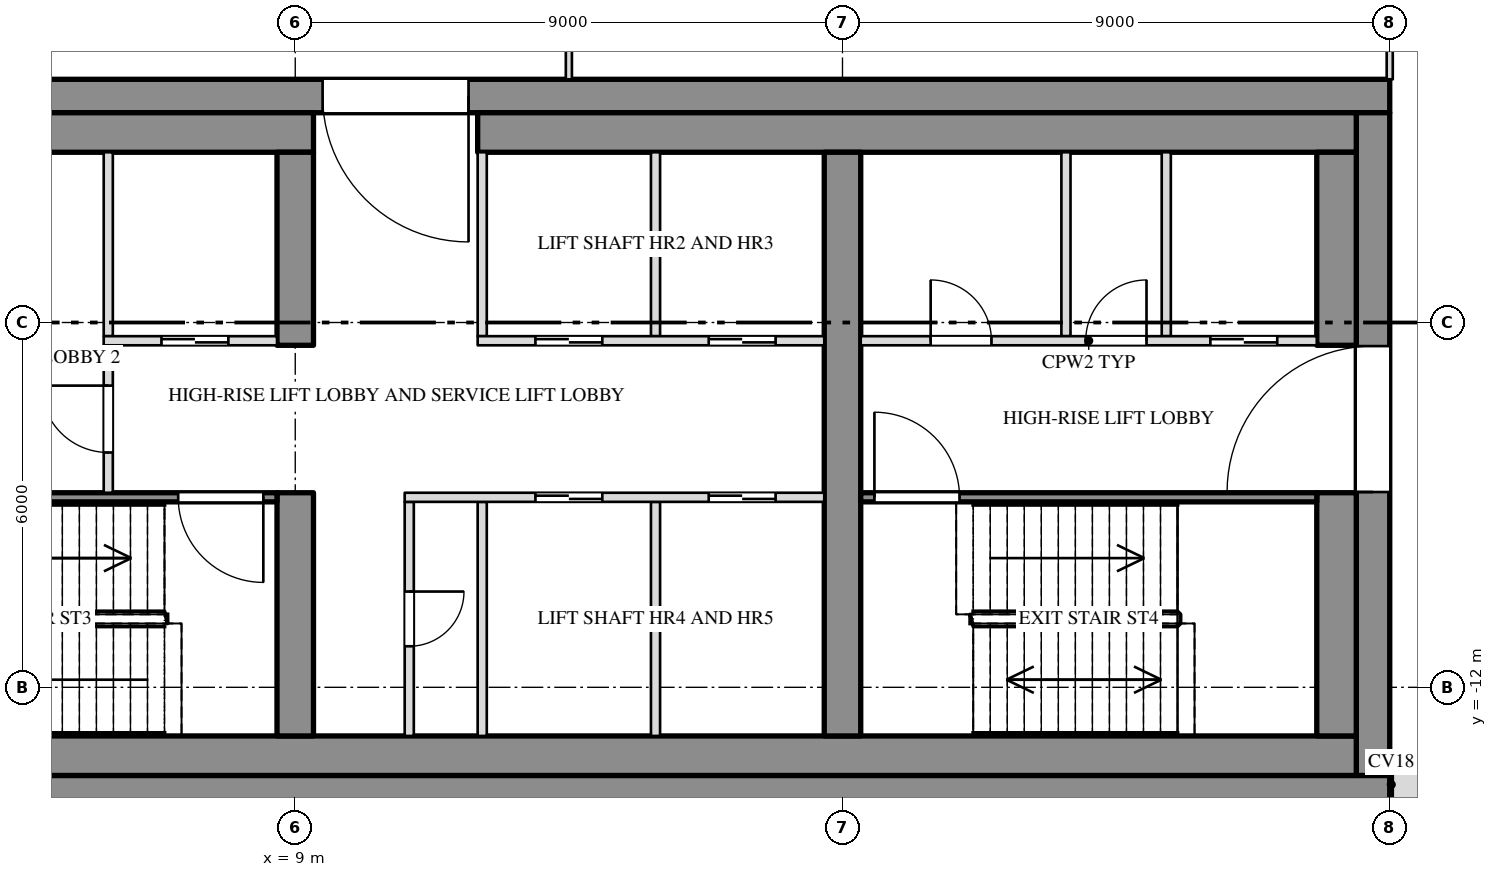
"""IFC4 building model, lengths in metres.
Left out: names, types, materials, properties, quantities, classifications, styles, units other than length and angle.
Written with IfcOpenShell. Run it as: python <this file> out.ifc"""

import sys

from ifc_helpers import new_model, si_unit, direction, frame, frame_2d, origin, place, context, subcontext, project, spatial, rectangle, extrude, element, fill, save


model = new_model("IFC4")
c1 = context("Model", 3, precision=1e-05, world=origin(), true_north=direction((0.0, 1.0)))
c2 = subcontext(c1, "Body", "Model", "MODEL_VIEW")
j1 = project(units=[si_unit("LENGTHUNIT", "METRE"), si_unit("PLANEANGLEUNIT", "RADIAN")], contexts=[c1])
p1 = place(None, origin())
s1 = spatial("IfcSite", under=j1, at=p1, CompositionType="ELEMENT")
p2 = place(p1, origin())
s2 = spatial("IfcBuilding", under=s1, at=p2, CompositionType="ELEMENT")
p3 = place(p2, frame((0.0, 0.0, 276.5)))
s3 = spatial("IfcBuildingStorey", under=s2, at=p3, CompositionType="ELEMENT", Elevation=276.5)
p4 = place(p3, frame((-27.0, -2.275, 0.0), z_axis=(0.0, 0.0, 1.0), x_axis=(1.0, 0.0, 0.0)))
e1 = element("IfcWall", 1, at=p4, inside=s3, PredefinedType="SHEAR", context=c2, shape_type="SweptSolid", body=[
    extrude(rectangle(XDim=54.0, YDim=0.55, at=frame_2d((27.0, 0.0))), origin(), (0.0, 0.0, 1.0), 3.78),
])
p5 = place(p4, frame((15.15, 0.0, 0.0)))
e2 = element("IfcOpeningElement", 2, at=p5, cuts=e1, PredefinedType="OPENING", context=c2, shape_type="SweptSolid", body=[
    extrude(rectangle(XDim=2.4, YDim=2.1, at=frame_2d((1.2, 1.05))), frame((0.0, 0.287, 0.0), z_axis=(0.0, -1.0, 0.0), x_axis=(1.0, 0.0, 0.0)), (0.0, 0.0, 1.0), 0.574),
])
p6 = place(p4, frame((36.45, 0.0, 0.0)))
e3 = element("IfcOpeningElement", 3, at=p6, cuts=e1, PredefinedType="OPENING", context=c2, shape_type="SweptSolid", body=[
    extrude(rectangle(XDim=2.4, YDim=2.1, at=frame_2d((1.2, 1.05))), frame((0.0, 0.287, 0.0), z_axis=(0.0, -1.0, 0.0), x_axis=(1.0, 0.0, 0.0)), (0.0, 0.0, 1.0), 0.574),
])
p7 = place(p3, frame((-27.0, -13.725, 0.0), z_axis=(0.0, 0.0, 1.0), x_axis=(1.0, 0.0, 0.0)))
e4 = element("IfcWall", 4, at=p7, inside=s3, PredefinedType="SHEAR", context=c2, shape_type="SweptSolid", body=[
    extrude(rectangle(XDim=54.0, YDim=0.55, at=frame_2d((27.0, 0.0))), origin(), (0.0, 0.0, 1.0), 3.78),
])
p8 = place(p3, frame((26.725, -13.45, 0.0), z_axis=(0.0, 0.0, 1.0), x_axis=(0.0, 1.0, 0.0)))
e5 = element("IfcWall", 5, at=p8, inside=s3, PredefinedType="SHEAR", context=c2, shape_type="SweptSolid", body=[
    extrude(rectangle(XDim=10.9, YDim=0.55, at=frame_2d((5.45, 0.0))), origin(), (0.0, 0.0, 1.0), 3.78),
])
p9 = place(p8, frame((4.662, 0.0, 0.0)))
e6 = element("IfcOpeningElement", 6, at=p9, cuts=e5, PredefinedType="OPENING", context=c2, shape_type="SweptSolid", body=[
    extrude(rectangle(XDim=2.4, YDim=2.1, at=frame_2d((1.2, 1.05))), frame((0.0, 0.287, 0.0), z_axis=(0.0, -1.0, 0.0), x_axis=(1.0, 0.0, 0.0)), (0.0, 0.0, 1.0), 0.574),
])
p10 = place(p3, frame((-9.3, -2.875, 0.0), z_axis=(0.0, 0.0, 1.0), x_axis=(1.0, 0.0, 0.0)))
e7 = element("IfcWall", 7, at=p10, inside=s3, PredefinedType="SHEAR", context=c2, shape_type="SweptSolid", body=[
    extrude(rectangle(XDim=18.6, YDim=0.65, at=frame_2d((9.3, 0.0))), origin(), (0.0, 0.0, 1.0), 3.78),
])
p11 = place(p3, frame((12.0, -2.875, 0.0), z_axis=(0.0, 0.0, 1.0), x_axis=(1.0, 0.0, 0.0)))
e8 = element("IfcWall", 8, at=p11, inside=s3, PredefinedType="SHEAR", context=c2, shape_type="SweptSolid", body=[
    extrude(rectangle(XDim=14.45, YDim=0.65, at=frame_2d((7.225, 0.0))), origin(), (0.0, 0.0, 1.0), 3.78),
])
p12 = place(p3, frame((-26.45, -13.125, 0.0), z_axis=(0.0, 0.0, 1.0), x_axis=(1.0, 0.0, 0.0)))
e9 = element("IfcWall", 9, at=p12, inside=s3, PredefinedType="SHEAR", context=c2, shape_type="SweptSolid", body=[
    extrude(rectangle(XDim=52.9, YDim=0.65, at=frame_2d((26.45, 0.0))), origin(), (0.0, 0.0, 1.0), 3.78),
])
p13 = place(p3, frame((26.125, -12.8, 0.0), z_axis=(0.0, 0.0, 1.0), x_axis=(0.0, 1.0, 0.0)))
e10 = element("IfcWall", 10, at=p13, inside=s3, PredefinedType="SHEAR", context=c2, shape_type="SweptSolid", body=[
    extrude(rectangle(XDim=4.0, YDim=0.65, at=frame_2d((2.0, 0.0))), origin(), (0.0, 0.0, 1.0), 3.78),
])
p14 = place(p3, frame((26.125, -6.375, 0.0), z_axis=(0.0, 0.0, 1.0), x_axis=(0.0, 1.0, 0.0)))
e11 = element("IfcWall", 11, at=p14, inside=s3, PredefinedType="SHEAR", context=c2, shape_type="SweptSolid", body=[
    extrude(rectangle(XDim=3.175, YDim=0.65, at=frame_2d((1.587, 0.0))), origin(), (0.0, 0.0, 1.0), 3.78),
])
p15 = place(p3, frame((9.0, -12.8, 0.0), z_axis=(0.0, 0.0, 1.0), x_axis=(0.0, 1.0, 0.0)))
e12 = element("IfcWall", 12, at=p15, inside=s3, PredefinedType="SHEAR", context=c2, shape_type="SweptSolid", body=[
    extrude(rectangle(XDim=4.0, YDim=0.6, at=frame_2d((2.0, 0.0))), origin(), (0.0, 0.0, 1.0), 3.78),
])
p16 = place(p3, frame((9.0, -6.375, 0.0), z_axis=(0.0, 0.0, 1.0), x_axis=(0.0, 1.0, 0.0)))
e13 = element("IfcWall", 13, at=p16, inside=s3, PredefinedType="SHEAR", context=c2, shape_type="SweptSolid", body=[
    extrude(rectangle(XDim=3.175, YDim=0.6, at=frame_2d((1.587, 0.0))), origin(), (0.0, 0.0, 1.0), 3.78),
])
p17 = place(p3, frame((18.0, -12.8, 0.0), z_axis=(0.0, 0.0, 1.0), x_axis=(0.0, 1.0, 0.0)))
e14 = element("IfcWall", 14, at=p17, inside=s3, PredefinedType="SHEAR", context=c2, shape_type="SweptSolid", body=[
    extrude(rectangle(XDim=9.6, YDim=0.6, at=frame_2d((4.8, 0.0))), origin(), (0.0, 0.0, 1.0), 3.78),
])
p18 = place(p3, frame((13.5, -2.0, 0.0), z_axis=(0.0, 0.0, 1.0), x_axis=(0.0, 1.0, 0.0)))
e15 = element("IfcWall", 15, at=p18, inside=s3, PredefinedType="PARTITIONING", context=c2, shape_type="SweptSolid", body=[
    extrude(rectangle(XDim=8.58, YDim=0.1, at=frame_2d((4.29, 0.0))), origin(), (0.0, 0.0, 1.0), 3.247),
])
p19 = place(p18, frame((3.85, 0.0, 0.0)))
e16 = element("IfcOpeningElement", 16, at=p19, cuts=e15, PredefinedType="OPENING", context=c2, shape_type="SweptSolid", body=[
    extrude(rectangle(XDim=0.9, YDim=2.1, at=frame_2d((0.45, 1.05))), frame((0.0, 0.062, 0.0), z_axis=(0.0, -1.0, 0.0), x_axis=(1.0, 0.0, 0.0)), (0.0, 0.0, 1.0), 0.124),
])
p20 = place(p3, frame((27.0, -2.0, 0.0), z_axis=(0.0, 0.0, 1.0), x_axis=(0.0, 1.0, 0.0)))
e17 = element("IfcWall", 17, at=p20, inside=s3, PredefinedType="PARTITIONING", context=c2, shape_type="SweptSolid", body=[
    extrude(rectangle(XDim=6.313, YDim=0.1, at=frame_2d((3.157, 0.0))), origin(), (0.0, 0.0, 1.0), 3.247),
])
p21 = place(p3, frame((27.05, -13.6, 0.0), z_axis=(0.0, 0.0, 1.0), x_axis=(1.0, 0.0, 0.0)))
e18 = element("IfcWall", 18, at=p21, inside=s3, PredefinedType="SOLIDWALL", context=c2, shape_type="SweptSolid", body=[
    extrude(rectangle(XDim=2.897, YDim=0.8, at=frame_2d((1.449, 0.0))), origin(), (0.0, 0.0, 1.0), 3.78),
])
for number, where, z_axis, x_axis in (
    (19, (5.925, -6.225, 0.0), (0.0, 0.0, 1.0), (0.0, 1.0, 0.0)),
    (20, (12.075, -6.225, 0.0), (0.0, 0.0, 1.0), (0.0, 1.0, 0.0)),
    (21, (14.925, -6.225, 0.0), (0.0, 0.0, 1.0), (0.0, 1.0, 0.0)),
    (22, (21.675, -6.225, 0.0), (0.0, 0.0, 1.0), (0.0, 1.0, 0.0)),
    (23, (23.325, -6.225, 0.0), (0.0, 0.0, 1.0), (0.0, 1.0, 0.0)),
):
    element("IfcWall", number, at=place(p3, frame(where, z_axis=z_axis, x_axis=x_axis)), inside=s3, PredefinedType="PARTITIONING", context=c2, shape_type="SweptSolid", body=[
        extrude(rectangle(XDim=3.025, YDim=0.15, at=frame_2d((1.513, 0.0))), origin(), (0.0, 0.0, 1.0), 3.78),
    ])
p22 = place(p3, frame((10.875, -12.8, 0.0), z_axis=(0.0, 0.0, 1.0), x_axis=(0.0, 1.0, 0.0)))
e24 = element("IfcWall", 24, at=p22, inside=s3, PredefinedType="PARTITIONING", context=c2, shape_type="SweptSolid", body=[
    extrude(rectangle(XDim=3.85, YDim=0.15, at=frame_2d((1.925, 0.0))), origin(), (0.0, 0.0, 1.0), 3.78),
])
p23 = place(p22, frame((1.475, 0.0, 0.0)))
e25 = element("IfcOpeningElement", 25, at=p23, cuts=e24, PredefinedType="OPENING", context=c2, shape_type="SweptSolid", body=[
    extrude(rectangle(XDim=0.9, YDim=2.1, at=frame_2d((0.45, 1.05))), frame((0.0, 0.087, 0.0), z_axis=(0.0, -1.0, 0.0), x_axis=(1.0, 0.0, 0.0)), (0.0, 0.0, 1.0), 0.174),
])
for number, where, z_axis, x_axis in (
    (26, (12.075, -12.8, 0.0), (0.0, 0.0, 1.0), (0.0, 1.0, 0.0)),
    (27, (14.925, -12.8, 0.0), (0.0, 0.0, 1.0), (0.0, 1.0, 0.0)),
):
    element("IfcWall", number, at=place(p3, frame(where, z_axis=z_axis, x_axis=x_axis)), inside=s3, PredefinedType="PARTITIONING", context=c2, shape_type="SweptSolid", body=[
        extrude(rectangle(XDim=3.85, YDim=0.15, at=frame_2d((1.925, 0.0))), origin(), (0.0, 0.0, 1.0), 3.78),
    ])
p24 = place(p3, frame((5.925, -8.8, 0.0), z_axis=(0.0, 0.0, 1.0), x_axis=(0.0, 1.0, 0.0)))
e28 = element("IfcWall", 28, at=p24, inside=s3, PredefinedType="PARTITIONING", context=c2, shape_type="SweptSolid", body=[
    extrude(rectangle(XDim=2.425, YDim=0.15, at=frame_2d((1.212, 0.0))), origin(), (0.0, 0.0, 1.0), 3.78),
])
p25 = place(p24, frame((0.662, 0.0, 0.0)))
e29 = element("IfcOpeningElement", 29, at=p25, cuts=e28, PredefinedType="OPENING", context=c2, shape_type="SweptSolid", body=[
    extrude(rectangle(XDim=1.1, YDim=2.1, at=frame_2d((0.55, 1.05))), frame((0.0, 0.087, 0.0), z_axis=(0.0, -1.0, 0.0), x_axis=(1.0, 0.0, 0.0)), (0.0, 0.0, 1.0), 0.174),
])
p26 = place(p3, frame((5.85, -6.3, 0.0), z_axis=(0.0, 0.0, 1.0), x_axis=(1.0, 0.0, 0.0)))
e30 = element("IfcWall", 30, at=p26, inside=s3, PredefinedType="PARTITIONING", context=c2, shape_type="SweptSolid", body=[
    extrude(rectangle(XDim=2.85, YDim=0.15, at=frame_2d((1.425, 0.0))), origin(), (0.0, 0.0, 1.0), 3.78),
])
p27 = place(p26, frame((0.95, 0.0, 0.0)))
e31 = element("IfcOpeningElement", 31, at=p27, cuts=e30, PredefinedType="OPENING", context=c2, shape_type="SweptSolid", body=[
    extrude(rectangle(XDim=1.1, YDim=2.1, at=frame_2d((0.55, 1.05))), frame((0.0, 0.087, 0.0), z_axis=(0.0, -1.0, 0.0), x_axis=(1.0, 0.0, 0.0)), (0.0, 0.0, 1.0), 0.174),
])
p28 = place(p3, frame((12.0, -6.3, 0.0), z_axis=(0.0, 0.0, 1.0), x_axis=(1.0, 0.0, 0.0)))
e32 = element("IfcWall", 32, at=p28, inside=s3, PredefinedType="PARTITIONING", context=c2, shape_type="SweptSolid", body=[
    extrude(rectangle(XDim=5.7, YDim=0.15, at=frame_2d((2.85, 0.0))), origin(), (0.0, 0.0, 1.0), 3.78),
])
p29 = place(p28, frame((0.95, 0.0, 0.0)))
e33 = element("IfcOpeningElement", 33, at=p29, cuts=e32, PredefinedType="OPENING", context=c2, shape_type="SweptSolid", body=[
    extrude(rectangle(XDim=1.1, YDim=2.1, at=frame_2d((0.55, 1.05))), frame((0.0, 0.087, 0.0), z_axis=(0.0, -1.0, 0.0), x_axis=(1.0, 0.0, 0.0)), (0.0, 0.0, 1.0), 0.174),
])
p30 = place(p28, frame((3.8, 0.0, 0.0)))
e34 = element("IfcOpeningElement", 34, at=p30, cuts=e32, PredefinedType="OPENING", context=c2, shape_type="SweptSolid", body=[
    extrude(rectangle(XDim=1.1, YDim=2.1, at=frame_2d((0.55, 1.05))), frame((0.0, 0.087, 0.0), z_axis=(0.0, -1.0, 0.0), x_axis=(1.0, 0.0, 0.0)), (0.0, 0.0, 1.0), 0.174),
])
p31 = place(p3, frame((18.3, -6.3, 0.0), z_axis=(0.0, 0.0, 1.0), x_axis=(1.0, 0.0, 0.0)))
e35 = element("IfcWall", 35, at=p31, inside=s3, PredefinedType="PARTITIONING", context=c2, shape_type="SweptSolid", body=[
    extrude(rectangle(XDim=7.5, YDim=0.15, at=frame_2d((3.75, 0.0))), origin(), (0.0, 0.0, 1.0), 3.78),
])
p32 = place(p31, frame((1.15, 0.0, 0.0)))
e36 = element("IfcOpeningElement", 36, at=p32, cuts=e35, PredefinedType="OPENING", context=c2, shape_type="SweptSolid", body=[
    extrude(rectangle(XDim=1.0, YDim=2.1, at=frame_2d((0.5, 1.05))), frame((0.0, 0.087, 0.0), z_axis=(0.0, -1.0, 0.0), x_axis=(1.0, 0.0, 0.0)), (0.0, 0.0, 1.0), 0.174),
])
p33 = place(p31, frame((3.7, 0.0, 0.0)))
e37 = element("IfcOpeningElement", 37, at=p33, cuts=e35, PredefinedType="OPENING", context=c2, shape_type="SweptSolid", body=[
    extrude(rectangle(XDim=1.0, YDim=2.1, at=frame_2d((0.5, 1.05))), frame((0.0, 0.087, 0.0), z_axis=(0.0, -1.0, 0.0), x_axis=(1.0, 0.0, 0.0)), (0.0, 0.0, 1.0), 0.174),
])
p34 = place(p31, frame((5.75, 0.0, 0.0)))
e38 = element("IfcOpeningElement", 38, at=p34, cuts=e35, PredefinedType="OPENING", context=c2, shape_type="SweptSolid", body=[
    extrude(rectangle(XDim=1.1, YDim=2.1, at=frame_2d((0.55, 1.05))), frame((0.0, 0.087, 0.0), z_axis=(0.0, -1.0, 0.0), x_axis=(1.0, 0.0, 0.0)), (0.0, 0.0, 1.0), 0.174),
])
p35 = place(p3, frame((0.3, -8.875, 0.0), z_axis=(0.0, 0.0, 1.0), x_axis=(1.0, 0.0, 0.0)))
e39 = element("IfcWall", 39, at=p35, inside=s3, PredefinedType="SHEAR", context=c2, shape_type="SweptSolid", body=[
    extrude(rectangle(XDim=8.4, YDim=0.15, at=frame_2d((4.2, 0.0))), origin(), (0.0, 0.0, 1.0), 3.78),
])
p36 = place(p35, frame((6.775, 0.0, 0.0)))
e40 = element("IfcOpeningElement", 40, at=p36, cuts=e39, PredefinedType="OPENING", context=c2, shape_type="SweptSolid", body=[
    extrude(rectangle(XDim=1.4, YDim=2.1, at=frame_2d((0.7, 1.05))), frame((0.0, 0.087, 0.0), z_axis=(0.0, -1.0, 0.0), x_axis=(1.0, 0.0, 0.0)), (0.0, 0.0, 1.0), 0.174),
])
p37 = place(p3, frame((10.8, -8.875, 0.0), z_axis=(0.0, 0.0, 1.0), x_axis=(1.0, 0.0, 0.0)))
e41 = element("IfcWall", 41, at=p37, inside=s3, PredefinedType="PARTITIONING", context=c2, shape_type="SweptSolid", body=[
    extrude(rectangle(XDim=6.9, YDim=0.15, at=frame_2d((3.45, 0.0))), origin(), (0.0, 0.0, 1.0), 3.78),
])
p38 = place(p37, frame((2.15, 0.0, 0.0)))
e42 = element("IfcOpeningElement", 42, at=p38, cuts=e41, PredefinedType="OPENING", context=c2, shape_type="SweptSolid", body=[
    extrude(rectangle(XDim=1.1, YDim=2.1, at=frame_2d((0.55, 1.05))), frame((0.0, 0.087, 0.0), z_axis=(0.0, -1.0, 0.0), x_axis=(1.0, 0.0, 0.0)), (0.0, 0.0, 1.0), 0.174),
])
p39 = place(p37, frame((5.0, 0.0, 0.0)))
e43 = element("IfcOpeningElement", 43, at=p39, cuts=e41, PredefinedType="OPENING", context=c2, shape_type="SweptSolid", body=[
    extrude(rectangle(XDim=1.1, YDim=2.1, at=frame_2d((0.55, 1.05))), frame((0.0, 0.087, 0.0), z_axis=(0.0, -1.0, 0.0), x_axis=(1.0, 0.0, 0.0)), (0.0, 0.0, 1.0), 0.174),
])
p40 = place(p3, frame((18.3, -8.875, 0.0), z_axis=(0.0, 0.0, 1.0), x_axis=(1.0, 0.0, 0.0)))
e44 = element("IfcWall", 44, at=p40, inside=s3, PredefinedType="SHEAR", context=c2, shape_type="SweptSolid", body=[
    extrude(rectangle(XDim=7.5, YDim=0.15, at=frame_2d((3.75, 0.0))), origin(), (0.0, 0.0, 1.0), 3.78),
])
p41 = place(p40, frame((0.225, 0.0, 0.0)))
e45 = element("IfcOpeningElement", 45, at=p41, cuts=e44, PredefinedType="OPENING", context=c2, shape_type="SweptSolid", body=[
    extrude(rectangle(XDim=1.4, YDim=2.1, at=frame_2d((0.7, 1.05))), frame((0.0, 0.087, 0.0), z_axis=(0.0, -1.0, 0.0), x_axis=(1.0, 0.0, 0.0)), (0.0, 0.0, 1.0), 0.174),
])
p42 = place(p25, origin())
e46 = element("IfcDoor", 46, at=p42, inside=s3, OperationType="SINGLE_SWING_RIGHT", PredefinedType="DOOR", context=c2, shape_type="SweptSolid", body=[
    extrude(rectangle(XDim=1.1, YDim=2.1, at=frame_2d((0.55, 1.05))), frame((0.0, 0.025, 0.0), z_axis=(0.0, -1.0, 0.0), x_axis=(1.0, 0.0, 0.0)), (0.0, 0.0, 1.0), 0.05),
])
fill(e29, e46)
p43 = place(p27, origin())
e47 = element("IfcDoor", 47, at=p43, inside=s3, OperationType="SLIDING_TO_RIGHT", PredefinedType="DOOR", context=c2, shape_type="SweptSolid", body=[
    extrude(rectangle(XDim=1.1, YDim=2.1, at=frame_2d((0.55, 1.05))), frame((0.0, 0.025, 0.0), z_axis=(0.0, -1.0, 0.0), x_axis=(1.0, 0.0, 0.0)), (0.0, 0.0, 1.0), 0.05),
])
fill(e31, e47)
p44 = place(p36, origin())
e48 = element("IfcDoor", 48, at=p44, inside=s3, OperationType="DOUBLE_DOOR_SINGLE_SWING", PredefinedType="DOOR", context=c2, shape_type="SweptSolid", body=[
    extrude(rectangle(XDim=1.4, YDim=2.1, at=frame_2d((0.7, 1.05))), frame((0.0, 0.025, 0.0), z_axis=(0.0, -1.0, 0.0), x_axis=(1.0, 0.0, 0.0)), (0.0, 0.0, 1.0), 0.05),
])
fill(e40, e48)
p45 = place(p6, origin())
e49 = element("IfcDoor", 49, at=p45, inside=s3, OperationType="DOUBLE_DOOR_SINGLE_SWING", PredefinedType="DOOR", context=c2, shape_type="SweptSolid", body=[
    extrude(rectangle(XDim=2.4, YDim=2.1, at=frame_2d((1.2, 1.05))), frame((0.0, 0.025, 0.0), z_axis=(0.0, -1.0, 0.0), x_axis=(1.0, 0.0, 0.0)), (0.0, 0.0, 1.0), 0.05),
])
fill(e3, e49)
p46 = place(p23, origin())
e50 = element("IfcDoor", 50, at=p46, inside=s3, OperationType="SINGLE_SWING_LEFT", PredefinedType="DOOR", context=c2, shape_type="SweptSolid", body=[
    extrude(rectangle(XDim=0.9, YDim=2.1, at=frame_2d((0.45, 1.05))), frame((0.0, 0.025, 0.0), z_axis=(0.0, -1.0, 0.0), x_axis=(1.0, 0.0, 0.0)), (0.0, 0.0, 1.0), 0.05),
])
fill(e25, e50)
p47 = place(p38, origin())
e51 = element("IfcDoor", 51, at=p47, inside=s3, OperationType="SLIDING_TO_RIGHT", PredefinedType="DOOR", context=c2, shape_type="SweptSolid", body=[
    extrude(rectangle(XDim=1.1, YDim=2.1, at=frame_2d((0.55, 1.05))), frame((0.0, 0.025, 0.0), z_axis=(0.0, -1.0, 0.0), x_axis=(1.0, 0.0, 0.0)), (0.0, 0.0, 1.0), 0.05),
])
fill(e42, e51)
p48 = place(p29, origin())
e52 = element("IfcDoor", 52, at=p48, inside=s3, OperationType="SLIDING_TO_LEFT", PredefinedType="DOOR", context=c2, shape_type="SweptSolid", body=[
    extrude(rectangle(XDim=1.1, YDim=2.1, at=frame_2d((0.55, 1.05))), frame((0.0, 0.025, 0.0), z_axis=(0.0, -1.0, 0.0), x_axis=(1.0, 0.0, 0.0)), (0.0, 0.0, 1.0), 0.05),
])
fill(e33, e52)
p49 = place(p39, origin())
e53 = element("IfcDoor", 53, at=p49, inside=s3, OperationType="SLIDING_TO_RIGHT", PredefinedType="DOOR", context=c2, shape_type="SweptSolid", body=[
    extrude(rectangle(XDim=1.1, YDim=2.1, at=frame_2d((0.55, 1.05))), frame((0.0, 0.025, 0.0), z_axis=(0.0, -1.0, 0.0), x_axis=(1.0, 0.0, 0.0)), (0.0, 0.0, 1.0), 0.05),
])
fill(e43, e53)
p50 = place(p30, origin())
e54 = element("IfcDoor", 54, at=p50, inside=s3, OperationType="SLIDING_TO_LEFT", PredefinedType="DOOR", context=c2, shape_type="SweptSolid", body=[
    extrude(rectangle(XDim=1.1, YDim=2.1, at=frame_2d((0.55, 1.05))), frame((0.0, 0.025, 0.0), z_axis=(0.0, -1.0, 0.0), x_axis=(1.0, 0.0, 0.0)), (0.0, 0.0, 1.0), 0.05),
])
fill(e34, e54)
p51 = place(p41, origin())
e55 = element("IfcDoor", 55, at=p51, inside=s3, OperationType="DOUBLE_DOOR_SINGLE_SWING", PredefinedType="DOOR", context=c2, shape_type="SweptSolid", body=[
    extrude(rectangle(XDim=1.4, YDim=2.1, at=frame_2d((0.7, 1.05))), frame((0.0, 0.025, 0.0), z_axis=(0.0, -1.0, 0.0), x_axis=(1.0, 0.0, 0.0)), (0.0, 0.0, 1.0), 0.05),
])
fill(e45, e55)
p52 = place(p32, origin())
e56 = element("IfcDoor", 56, at=p52, inside=s3, OperationType="SINGLE_SWING_LEFT", PredefinedType="DOOR", context=c2, shape_type="SweptSolid", body=[
    extrude(rectangle(XDim=1.0, YDim=2.1, at=frame_2d((0.5, 1.05))), frame((0.0, 0.025, 0.0), z_axis=(0.0, -1.0, 0.0), x_axis=(1.0, 0.0, 0.0)), (0.0, 0.0, 1.0), 0.05),
])
fill(e36, e56)
p53 = place(p33, origin())
e57 = element("IfcDoor", 57, at=p53, inside=s3, OperationType="SINGLE_SWING_RIGHT", PredefinedType="DOOR", context=c2, shape_type="SweptSolid", body=[
    extrude(rectangle(XDim=1.0, YDim=2.1, at=frame_2d((0.5, 1.05))), frame((0.0, 0.025, 0.0), z_axis=(0.0, -1.0, 0.0), x_axis=(1.0, 0.0, 0.0)), (0.0, 0.0, 1.0), 0.05),
])
fill(e37, e57)
p54 = place(p34, origin())
e58 = element("IfcDoor", 58, at=p54, inside=s3, OperationType="SLIDING_TO_LEFT", PredefinedType="DOOR", context=c2, shape_type="SweptSolid", body=[
    extrude(rectangle(XDim=1.1, YDim=2.1, at=frame_2d((0.55, 1.05))), frame((0.0, 0.025, 0.0), z_axis=(0.0, -1.0, 0.0), x_axis=(1.0, 0.0, 0.0)), (0.0, 0.0, 1.0), 0.05),
])
fill(e38, e58)
p55 = place(p9, origin())
e59 = element("IfcDoor", 59, at=p55, inside=s3, OperationType="DOUBLE_DOOR_SINGLE_SWING", PredefinedType="DOOR", context=c2, shape_type="SweptSolid", body=[
    extrude(rectangle(XDim=2.4, YDim=2.1, at=frame_2d((1.2, 1.05))), frame((0.0, 0.025, 0.0), z_axis=(0.0, -1.0, 0.0), x_axis=(1.0, 0.0, 0.0)), (0.0, 0.0, 1.0), 0.05),
])
fill(e6, e59)
save(model, sys.argv[1])
